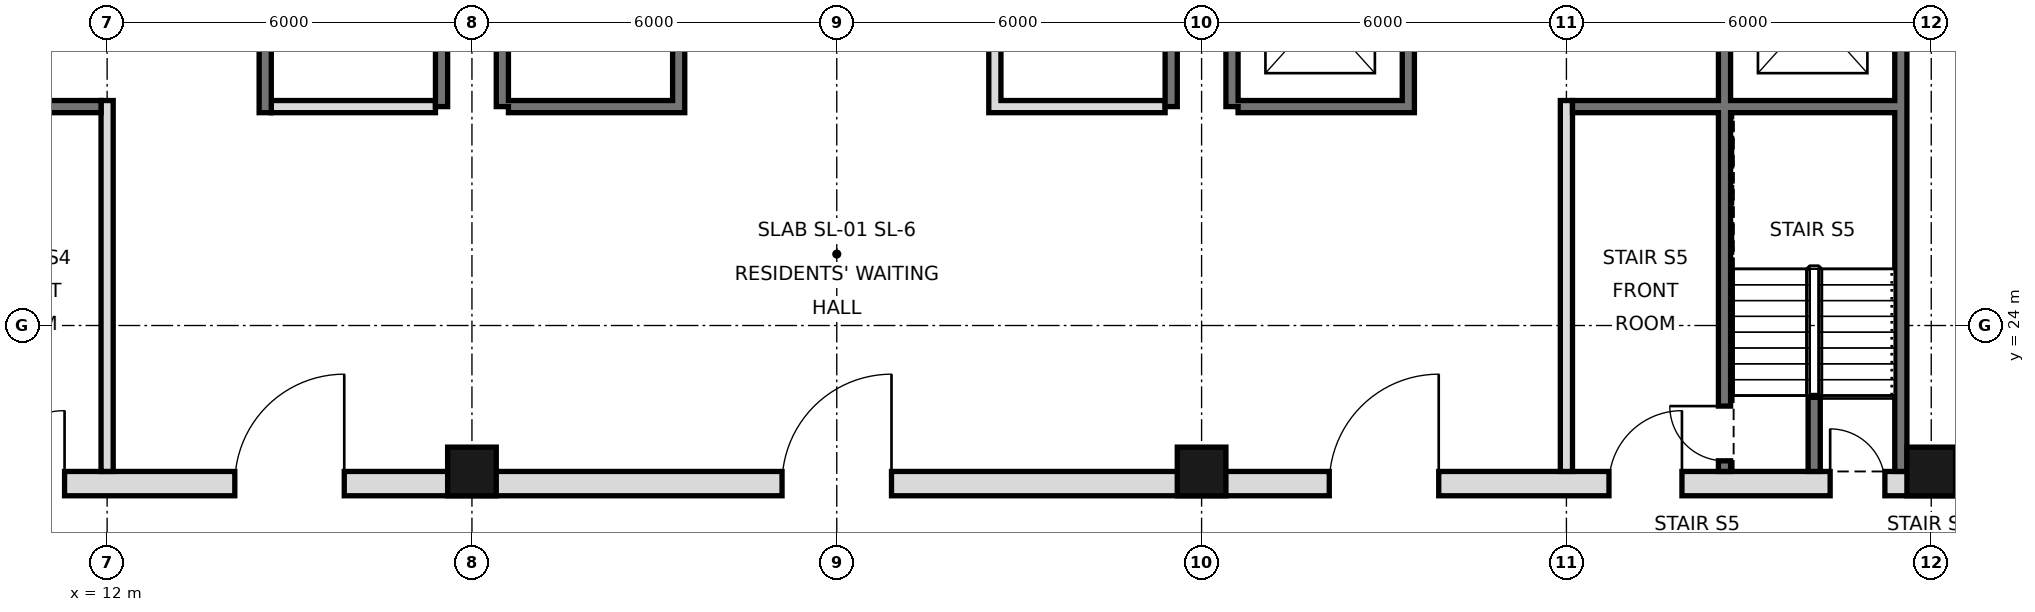
"""IFC4 building model, lengths in metres.
Left out: names, types, materials, properties, quantities, classifications, styles, units other than length and angle.
Written with IfcOpenShell. Run it as: python <this file> out.ifc"""

import sys

from ifc_helpers import new_model, si_unit, direction, frame, frame_2d, origin, origin_2d, place, context, subcontext, project, spatial, rectangle, hollow_rectangle, extrude, element, fill, save


model = new_model("IFC4")
c1 = context("Model", 3, precision=1e-05, world=origin(), true_north=direction((0.0, 1.0)))
c2 = subcontext(c1, "Body", "Model", "MODEL_VIEW")
j1 = project(units=[si_unit("LENGTHUNIT", "METRE"), si_unit("PLANEANGLEUNIT", "RADIAN")], contexts=[c1])
p1 = place(None, origin())
s1 = spatial("IfcSite", under=j1, at=p1, CompositionType="ELEMENT")
p2 = place(p1, origin())
s2 = spatial("IfcBuilding", under=s1, at=p2, CompositionType="ELEMENT")
p3 = place(p2, frame((0.0, 0.0, 186.0)))
s3 = spatial("IfcBuildingStorey", under=s2, at=p3, CompositionType="ELEMENT", Elevation=186.0)
for number, where, z_axis, x_axis in (
    (1, (18.0, 21.6, 0.0), (0.0, 0.0, 1.0), (1.0, 0.0, 0.0)),
    (2, (30.0, 21.6, 0.0), (0.0, 0.0, 1.0), (1.0, 0.0, 0.0)),
    (3, (42.0, 21.6, 0.0), (0.0, 0.0, 1.0), (1.0, 0.0, 0.0)),
):
    element("IfcColumn", number, at=place(p3, frame(where, z_axis=z_axis, x_axis=x_axis)), inside=s3, PredefinedType="COLUMN", context=c2, shape_type="SweptSolid", body=[
        extrude(hollow_rectangle(XDim=0.8, YDim=0.8, WallThickness=0.045, at=origin_2d()), origin(), (0.0, 0.0, 1.0), 6.0),
    ])
p4 = place(p3, frame((41.5, 21.6, 0.0), z_axis=(0.0, 0.0, 1.0), x_axis=(0.0, 1.0, 0.0)))
e4 = element("IfcWall", 4, at=p4, inside=s3, PredefinedType="SOLIDWALL", context=c2, shape_type="SweptSolid", body=[
    extrude(rectangle(XDim=23.5, YDim=0.2, at=frame_2d((11.75, 0.0))), origin(), (0.0, 0.0, 1.0), 5.7),
])
for number, where, z_axis, x_axis in (
    (5, (17.5, 27.6, 0.0), (0.0, 0.0, 1.0), (0.0, 1.0, 0.0)),
    (6, (18.5, 27.6, 0.0), (0.0, 0.0, 1.0), (0.0, 1.0, 0.0)),
    (7, (29.5, 27.6, 0.0), (0.0, 0.0, 1.0), (0.0, 1.0, 0.0)),
    (8, (30.5, 27.6, 0.0), (0.0, 0.0, 1.0), (0.0, 1.0, 0.0)),
):
    element("IfcWall", number, at=place(p3, frame(where, z_axis=z_axis, x_axis=x_axis)), inside=s3, PredefinedType="SOLIDWALL", context=c2, shape_type="SweptSolid", body=[
        extrude(rectangle(XDim=17.5, YDim=0.2, at=frame_2d((8.75, 0.0))), origin(), (0.0, 0.0, 1.0), 5.7),
    ])
p5 = place(p3, frame((5.6, 21.4, 0.0), z_axis=(0.0, 0.0, 1.0), x_axis=(1.0, 0.0, 0.0)))
e9 = element("IfcWall", 9, at=p5, inside=s3, PredefinedType="SOLIDWALL", context=c2, shape_type="SweptSolid", body=[
    extrude(rectangle(XDim=36.8, YDim=0.4, at=frame_2d((18.4, 0.0))), origin(), (0.0, 0.0, 1.0), 5.7),
])
p6 = place(p5, frame((8.5, 0.0, 0.0)))
e10 = element("IfcOpeningElement", 10, at=p6, cuts=e9, PredefinedType="OPENING", context=c2, shape_type="SweptSolid", body=[
    extrude(rectangle(XDim=1.8, YDim=2.1, at=frame_2d((0.9, 1.05))), frame((0.0, 0.21, 0.0), z_axis=(0.0, -1.0, 0.0), x_axis=(1.0, 0.0, 0.0)), (0.0, 0.0, 1.0), 0.42),
])
p7 = place(p5, frame((17.5, 0.0, 0.0)))
e11 = element("IfcOpeningElement", 11, at=p7, cuts=e9, PredefinedType="OPENING", context=c2, shape_type="SweptSolid", body=[
    extrude(rectangle(XDim=1.8, YDim=2.1, at=frame_2d((0.9, 1.05))), frame((0.0, 0.21, 0.0), z_axis=(0.0, -1.0, 0.0), x_axis=(1.0, 0.0, 0.0)), (0.0, 0.0, 1.0), 0.42),
])
p8 = place(p5, frame((26.5, 0.0, 0.0)))
e12 = element("IfcOpeningElement", 12, at=p8, cuts=e9, PredefinedType="OPENING", context=c2, shape_type="SweptSolid", body=[
    extrude(rectangle(XDim=1.8, YDim=2.1, at=frame_2d((0.9, 1.05))), frame((0.0, 0.21, 0.0), z_axis=(0.0, -1.0, 0.0), x_axis=(1.0, 0.0, 0.0)), (0.0, 0.0, 1.0), 0.42),
])
p9 = place(p5, frame((4.5, 0.0, 0.0)))
e13 = element("IfcOpeningElement", 13, at=p9, cuts=e9, PredefinedType="OPENING", context=c2, shape_type="SweptSolid", body=[
    extrude(rectangle(XDim=1.2, YDim=2.1, at=frame_2d((0.6, 1.05))), frame((0.0, 0.21, 0.0), z_axis=(0.0, -1.0, 0.0), x_axis=(1.0, 0.0, 0.0)), (0.0, 0.0, 1.0), 0.42),
])
p10 = place(p5, frame((31.1, 0.0, 0.0)))
e14 = element("IfcOpeningElement", 14, at=p10, cuts=e9, PredefinedType="OPENING", context=c2, shape_type="SweptSolid", body=[
    extrude(rectangle(XDim=1.2, YDim=2.1, at=frame_2d((0.6, 1.05))), frame((0.0, 0.21, 0.0), z_axis=(0.0, -1.0, 0.0), x_axis=(1.0, 0.0, 0.0)), (0.0, 0.0, 1.0), 0.42),
])
p11 = place(p5, frame((1.163, 0.0, 0.0)))
e15 = element("IfcOpeningElement", 15, at=p11, cuts=e9, PredefinedType="OPENING", context=c2, shape_type="SweptSolid", body=[
    extrude(rectangle(XDim=0.9, YDim=2.1, at=frame_2d((0.45, 1.05))), frame((0.0, 0.21, 0.0), z_axis=(0.0, -1.0, 0.0), x_axis=(1.0, 0.0, 0.0)), (0.0, 0.0, 1.0), 0.42),
])
p12 = place(p5, frame((34.738, 0.0, 0.0)))
e16 = element("IfcOpeningElement", 16, at=p12, cuts=e9, PredefinedType="OPENING", context=c2, shape_type="SweptSolid", body=[
    extrude(rectangle(XDim=0.9, YDim=2.1, at=frame_2d((0.45, 1.05))), frame((0.0, 0.21, 0.0), z_axis=(0.0, -1.0, 0.0), x_axis=(1.0, 0.0, 0.0)), (0.0, 0.0, 1.0), 0.42),
])
p13 = place(p3, frame((12.0, 21.6, 0.0), z_axis=(0.0, 0.0, 1.0), x_axis=(0.0, 1.0, 0.0)))
e17 = element("IfcWall", 17, at=p13, inside=s3, PredefinedType="PARTITIONING", context=c2, shape_type="SweptSolid", body=[
    extrude(rectangle(XDim=6.1, YDim=0.2, at=frame_2d((3.05, 0.0))), origin(), (0.0, 0.0, 1.0), 5.7),
])
p14 = place(p3, frame((14.6, 27.5, 0.0), z_axis=(0.0, 0.0, 1.0), x_axis=(0.0, 1.0, 0.0)))
e18 = element("IfcWall", 18, at=p14, inside=s3, PredefinedType="SOLIDWALL", context=c2, shape_type="SweptSolid", body=[
    extrude(rectangle(XDim=17.5, YDim=0.2, at=frame_2d((8.75, 0.0))), origin(), (0.0, 0.0, 1.0), 5.7),
])
p15 = place(p14, frame((15.4, 0.0, 0.0)))
e19 = element("IfcOpeningElement", 19, at=p15, cuts=e18, PredefinedType="OPENING", context=c2, shape_type="SweptSolid", body=[
    extrude(rectangle(XDim=1.1, YDim=2.1, at=frame_2d((0.55, 1.05))), frame((0.0, 0.11, 0.0), z_axis=(0.0, -1.0, 0.0), x_axis=(1.0, 0.0, 0.0)), (0.0, 0.0, 1.0), 0.22),
])
p16 = place(p14, frame((2.7, 0.0, 0.0)))
e20 = element("IfcOpeningElement", 20, at=p16, cuts=e18, PredefinedType="OPENING", context=c2, shape_type="SweptSolid", body=[
    extrude(rectangle(XDim=1.0, YDim=2.1, at=frame_2d((0.5, 1.05))), frame((0.0, 0.11, 0.0), z_axis=(0.0, -1.0, 0.0), x_axis=(1.0, 0.0, 0.0)), (0.0, 0.0, 1.0), 0.22),
])
p17 = place(p14, frame((9.9, 0.0, 0.0)))
e21 = element("IfcOpeningElement", 21, at=p17, cuts=e18, PredefinedType="OPENING", context=c2, shape_type="SweptSolid", body=[
    extrude(rectangle(XDim=0.9, YDim=2.1, at=frame_2d((0.45, 1.05))), frame((0.0, 0.11, 0.0), z_axis=(0.0, -1.0, 0.0), x_axis=(1.0, 0.0, 0.0)), (0.0, 0.0, 1.0), 0.22),
])
p18 = place(p3, frame((21.4, 27.5, 0.0), z_axis=(0.0, 0.0, 1.0), x_axis=(0.0, 1.0, 0.0)))
e22 = element("IfcWall", 22, at=p18, inside=s3, PredefinedType="SOLIDWALL", context=c2, shape_type="SweptSolid", body=[
    extrude(rectangle(XDim=17.5, YDim=0.2, at=frame_2d((8.75, 0.0))), origin(), (0.0, 0.0, 1.0), 5.7),
])
p19 = place(p18, frame((9.8, 0.0, 0.0)))
e23 = element("IfcOpeningElement", 23, at=p19, cuts=e22, PredefinedType="OPENING", context=c2, shape_type="SweptSolid", body=[
    extrude(rectangle(XDim=1.0, YDim=2.1, at=frame_2d((0.5, 1.05))), frame((0.0, 0.11, 0.0), z_axis=(0.0, -1.0, 0.0), x_axis=(1.0, 0.0, 0.0)), (0.0, 0.0, 1.0), 0.22),
])
p20 = place(p18, frame((16.2, 0.0, 0.0)))
e24 = element("IfcOpeningElement", 24, at=p20, cuts=e22, PredefinedType="OPENING", context=c2, shape_type="SweptSolid", body=[
    extrude(rectangle(XDim=1.0, YDim=2.1, at=frame_2d((0.5, 1.05))), frame((0.0, 0.11, 0.0), z_axis=(0.0, -1.0, 0.0), x_axis=(1.0, 0.0, 0.0)), (0.0, 0.0, 1.0), 0.22),
])
p21 = place(p18, frame((7.4, 0.0, 0.0)))
e25 = element("IfcOpeningElement", 25, at=p21, cuts=e22, PredefinedType="OPENING", context=c2, shape_type="SweptSolid", body=[
    extrude(rectangle(XDim=0.9, YDim=2.1, at=frame_2d((0.45, 1.05))), frame((0.0, 0.11, 0.0), z_axis=(0.0, -1.0, 0.0), x_axis=(1.0, 0.0, 0.0)), (0.0, 0.0, 1.0), 0.22),
])
p22 = place(p3, frame((26.6, 27.5, 0.0), z_axis=(0.0, 0.0, 1.0), x_axis=(0.0, 1.0, 0.0)))
e26 = element("IfcWall", 26, at=p22, inside=s3, PredefinedType="SOLIDWALL", context=c2, shape_type="SweptSolid", body=[
    extrude(rectangle(XDim=17.5, YDim=0.2, at=frame_2d((8.75, 0.0))), origin(), (0.0, 0.0, 1.0), 5.7),
])
p23 = place(p22, frame((4.3, 0.0, 0.0)))
e27 = element("IfcOpeningElement", 27, at=p23, cuts=e26, PredefinedType="OPENING", context=c2, shape_type="SweptSolid", body=[
    extrude(rectangle(XDim=0.9, YDim=2.1, at=frame_2d((0.45, 1.05))), frame((0.0, 0.11, 0.0), z_axis=(0.0, -1.0, 0.0), x_axis=(1.0, 0.0, 0.0)), (0.0, 0.0, 1.0), 0.22),
])
p24 = place(p22, frame((10.35, 0.0, 0.0)))
e28 = element("IfcOpeningElement", 28, at=p24, cuts=e26, PredefinedType="OPENING", context=c2, shape_type="SweptSolid", body=[
    extrude(rectangle(XDim=1.0, YDim=2.1, at=frame_2d((0.5, 1.05))), frame((0.0, 0.11, 0.0), z_axis=(0.0, -1.0, 0.0), x_axis=(1.0, 0.0, 0.0)), (0.0, 0.0, 1.0), 0.22),
])
p25 = place(p22, frame((14.575, 0.0, 0.0)))
e29 = element("IfcOpeningElement", 29, at=p25, cuts=e26, PredefinedType="OPENING", context=c2, shape_type="SweptSolid", body=[
    extrude(rectangle(XDim=1.0, YDim=2.1, at=frame_2d((0.5, 1.05))), frame((0.0, 0.11, 0.0), z_axis=(0.0, -1.0, 0.0), x_axis=(1.0, 0.0, 0.0)), (0.0, 0.0, 1.0), 0.22),
])
p26 = place(p3, frame((33.4, 27.5, 0.0), z_axis=(0.0, 0.0, 1.0), x_axis=(0.0, 1.0, 0.0)))
e30 = element("IfcWall", 30, at=p26, inside=s3, PredefinedType="SOLIDWALL", context=c2, shape_type="SweptSolid", body=[
    extrude(rectangle(XDim=17.5, YDim=0.2, at=frame_2d((8.75, 0.0))), origin(), (0.0, 0.0, 1.0), 5.7),
])
p27 = place(p26, frame((1.1, 0.0, 0.0)))
e31 = element("IfcOpeningElement", 31, at=p27, cuts=e30, PredefinedType="OPENING", context=c2, shape_type="SweptSolid", body=[
    extrude(rectangle(XDim=1.1, YDim=2.1, at=frame_2d((0.55, 1.05))), frame((0.0, 0.11, 0.0), z_axis=(0.0, -1.0, 0.0), x_axis=(1.0, 0.0, 0.0)), (0.0, 0.0, 1.0), 0.22),
])
p28 = place(p26, frame((4.2, 0.0, 0.0)))
e32 = element("IfcOpeningElement", 32, at=p28, cuts=e30, PredefinedType="OPENING", context=c2, shape_type="SweptSolid", body=[
    extrude(rectangle(XDim=1.1, YDim=2.1, at=frame_2d((0.55, 1.05))), frame((0.0, 0.11, 0.0), z_axis=(0.0, -1.0, 0.0), x_axis=(1.0, 0.0, 0.0)), (0.0, 0.0, 1.0), 0.22),
])
p29 = place(p26, frame((15.4, 0.0, 0.0)))
e33 = element("IfcOpeningElement", 33, at=p29, cuts=e30, PredefinedType="OPENING", context=c2, shape_type="SweptSolid", body=[
    extrude(rectangle(XDim=1.1, YDim=2.1, at=frame_2d((0.55, 1.05))), frame((0.0, 0.11, 0.0), z_axis=(0.0, -1.0, 0.0), x_axis=(1.0, 0.0, 0.0)), (0.0, 0.0, 1.0), 0.22),
])
p30 = place(p26, frame((9.9, 0.0, 0.0)))
e34 = element("IfcOpeningElement", 34, at=p30, cuts=e30, PredefinedType="OPENING", context=c2, shape_type="SweptSolid", body=[
    extrude(rectangle(XDim=0.9, YDim=2.1, at=frame_2d((0.45, 1.05))), frame((0.0, 0.11, 0.0), z_axis=(0.0, -1.0, 0.0), x_axis=(1.0, 0.0, 0.0)), (0.0, 0.0, 1.0), 0.22),
])
p31 = place(p3, frame((36.0, 21.6, 0.0), z_axis=(0.0, 0.0, 1.0), x_axis=(0.0, 1.0, 0.0)))
e35 = element("IfcWall", 35, at=p31, inside=s3, PredefinedType="PARTITIONING", context=c2, shape_type="SweptSolid", body=[
    extrude(rectangle(XDim=6.1, YDim=0.2, at=frame_2d((3.05, 0.0))), origin(), (0.0, 0.0, 1.0), 5.7),
])
p32 = place(p3, frame((38.6, 21.6, 0.0), z_axis=(0.0, 0.0, 1.0), x_axis=(0.0, 1.0, 0.0)))
e36 = element("IfcWall", 36, at=p32, inside=s3, PredefinedType="SOLIDWALL", context=c2, shape_type="SweptSolid", body=[
    extrude(rectangle(XDim=23.4, YDim=0.2, at=frame_2d((11.7, 0.0))), origin(), (0.0, 0.0, 1.0), 5.7),
])
p33 = place(p32, frame((7.0, 0.0, 0.0)))
e37 = element("IfcOpeningElement", 37, at=p33, cuts=e36, PredefinedType="OPENING", context=c2, shape_type="SweptSolid", body=[
    extrude(rectangle(XDim=1.1, YDim=2.1, at=frame_2d((0.55, 1.05))), frame((0.0, 0.11, 0.0), z_axis=(0.0, -1.0, 0.0), x_axis=(1.0, 0.0, 0.0)), (0.0, 0.0, 1.0), 0.22),
])
p34 = place(p32, frame((10.1, 0.0, 0.0)))
e38 = element("IfcOpeningElement", 38, at=p34, cuts=e36, PredefinedType="OPENING", context=c2, shape_type="SweptSolid", body=[
    extrude(rectangle(XDim=1.1, YDim=2.1, at=frame_2d((0.55, 1.05))), frame((0.0, 0.11, 0.0), z_axis=(0.0, -1.0, 0.0), x_axis=(1.0, 0.0, 0.0)), (0.0, 0.0, 1.0), 0.22),
])
p35 = place(p32, frame((13.2, 0.0, 0.0)))
e39 = element("IfcOpeningElement", 39, at=p35, cuts=e36, PredefinedType="OPENING", context=c2, shape_type="SweptSolid", body=[
    extrude(rectangle(XDim=1.1, YDim=2.1, at=frame_2d((0.55, 1.05))), frame((0.0, 0.11, 0.0), z_axis=(0.0, -1.0, 0.0), x_axis=(1.0, 0.0, 0.0)), (0.0, 0.0, 1.0), 0.22),
])
p36 = place(p32, frame((15.7, 0.0, 0.0)))
e40 = element("IfcOpeningElement", 40, at=p36, cuts=e36, PredefinedType="OPENING", context=c2, shape_type="SweptSolid", body=[
    extrude(rectangle(XDim=1.0, YDim=2.1, at=frame_2d((0.5, 1.05))), frame((0.0, 0.11, 0.0), z_axis=(0.0, -1.0, 0.0), x_axis=(1.0, 0.0, 0.0)), (0.0, 0.0, 1.0), 0.22),
])
p37 = place(p32, frame((22.1, 0.0, 0.0)))
e41 = element("IfcOpeningElement", 41, at=p37, cuts=e36, PredefinedType="OPENING", context=c2, shape_type="SweptSolid", body=[
    extrude(rectangle(XDim=1.0, YDim=2.1, at=frame_2d((0.5, 1.05))), frame((0.0, 0.11, 0.0), z_axis=(0.0, -1.0, 0.0), x_axis=(1.0, 0.0, 0.0)), (0.0, 0.0, 1.0), 0.22),
])
p38 = place(p32, frame((0.175, 0.0, 0.0)))
e42 = element("IfcOpeningElement", 42, at=p38, cuts=e36, PredefinedType="OPENING", context=c2, shape_type="SweptSolid", body=[
    extrude(rectangle(XDim=0.9, YDim=2.1, at=frame_2d((0.45, 1.05))), frame((0.0, 0.11, 0.0), z_axis=(0.0, -1.0, 0.0), x_axis=(1.0, 0.0, 0.0)), (0.0, 0.0, 1.0), 0.22),
])
p39 = place(p3, frame((40.075, 21.6, 0.0), z_axis=(0.0, 0.0, 1.0), x_axis=(0.0, 1.0, 0.0)))
e43 = element("IfcWall", 43, at=p39, inside=s3, PredefinedType="SOLIDWALL", context=c2, shape_type="SweptSolid", body=[
    extrude(rectangle(XDim=1.25, YDim=0.2, at=frame_2d((0.625, 0.0))), origin(), (0.0, 0.0, 1.0), 5.7),
])
p40 = place(p3, frame((14.7, 27.6, 0.0), z_axis=(0.0, 0.0, 1.0), x_axis=(1.0, 0.0, 0.0)))
e44 = element("IfcWall", 44, at=p40, inside=s3, PredefinedType="PARTITIONING", context=c2, shape_type="SweptSolid", body=[
    extrude(rectangle(XDim=2.7, YDim=0.2, at=frame_2d((1.35, 0.0))), origin(), (0.0, 0.0, 1.0), 5.7),
])
for number, where, z_axis, x_axis in (
    (45, (18.6, 27.6, 0.0), (0.0, 0.0, 1.0), (1.0, 0.0, 0.0)),
    (46, (26.7, 27.6, 0.0), (0.0, 0.0, 1.0), (1.0, 0.0, 0.0)),
    (47, (30.6, 27.6, 0.0), (0.0, 0.0, 1.0), (1.0, 0.0, 0.0)),
):
    element("IfcWall", number, at=place(p3, frame(where, z_axis=z_axis, x_axis=x_axis)), inside=s3, PredefinedType="SOLIDWALL", context=c2, shape_type="SweptSolid", body=[
        extrude(rectangle(XDim=2.7, YDim=0.2, at=frame_2d((1.35, 0.0))), origin(), (0.0, 0.0, 1.0), 5.7),
    ])
for number, where, z_axis, x_axis in (
    (48, (36.1, 27.6, 0.0), (0.0, 0.0, 1.0), (1.0, 0.0, 0.0)),
    (49, (6.6, 27.6, 0.0), (0.0, 0.0, 1.0), (1.0, 0.0, 0.0)),
):
    element("IfcWall", number, at=place(p3, frame(where, z_axis=z_axis, x_axis=x_axis)), inside=s3, PredefinedType="SOLIDWALL", context=c2, shape_type="SweptSolid", body=[
        extrude(rectangle(XDim=5.3, YDim=0.2, at=frame_2d((2.65, 0.0))), origin(), (0.0, 0.0, 1.0), 5.7),
    ])
p41 = place(p6, frame((1.8, 0.0, 0.0), z_axis=(0.0, 0.0, 1.0), x_axis=(-1.0, 0.0, 0.0)))
e50 = element("IfcDoor", 50, at=p41, inside=s3, OperationType="SINGLE_SWING_LEFT", PredefinedType="DOOR", context=c2, shape_type="SweptSolid", body=[
    extrude(rectangle(XDim=1.8, YDim=2.1, at=frame_2d((0.9, 1.05))), frame((0.0, 0.025, 0.0), z_axis=(0.0, -1.0, 0.0), x_axis=(1.0, 0.0, 0.0)), (0.0, 0.0, 1.0), 0.05),
])
fill(e10, e50)
p42 = place(p7, frame((1.8, 0.0, 0.0), z_axis=(0.0, 0.0, 1.0), x_axis=(-1.0, 0.0, 0.0)))
e51 = element("IfcDoor", 51, at=p42, inside=s3, OperationType="SINGLE_SWING_LEFT", PredefinedType="DOOR", context=c2, shape_type="SweptSolid", body=[
    extrude(rectangle(XDim=1.8, YDim=2.1, at=frame_2d((0.9, 1.05))), frame((0.0, 0.025, 0.0), z_axis=(0.0, -1.0, 0.0), x_axis=(1.0, 0.0, 0.0)), (0.0, 0.0, 1.0), 0.05),
])
fill(e11, e51)
p43 = place(p8, frame((1.8, 0.0, 0.0), z_axis=(0.0, 0.0, 1.0), x_axis=(-1.0, 0.0, 0.0)))
e52 = element("IfcDoor", 52, at=p43, inside=s3, OperationType="SINGLE_SWING_LEFT", PredefinedType="DOOR", context=c2, shape_type="SweptSolid", body=[
    extrude(rectangle(XDim=1.8, YDim=2.1, at=frame_2d((0.9, 1.05))), frame((0.0, 0.025, 0.0), z_axis=(0.0, -1.0, 0.0), x_axis=(1.0, 0.0, 0.0)), (0.0, 0.0, 1.0), 0.05),
])
fill(e12, e52)
p44 = place(p9, frame((1.2, 0.0, 0.0), z_axis=(0.0, 0.0, 1.0), x_axis=(-1.0, 0.0, 0.0)))
e53 = element("IfcDoor", 53, at=p44, inside=s3, OperationType="SINGLE_SWING_LEFT", PredefinedType="DOOR", context=c2, shape_type="SweptSolid", body=[
    extrude(rectangle(XDim=1.2, YDim=2.1, at=frame_2d((0.6, 1.05))), frame((0.0, 0.025, 0.0), z_axis=(0.0, -1.0, 0.0), x_axis=(1.0, 0.0, 0.0)), (0.0, 0.0, 1.0), 0.05),
])
fill(e13, e53)
p45 = place(p10, frame((1.2, 0.0, 0.0), z_axis=(0.0, 0.0, 1.0), x_axis=(-1.0, 0.0, 0.0)))
e54 = element("IfcDoor", 54, at=p45, inside=s3, OperationType="SINGLE_SWING_LEFT", PredefinedType="DOOR", context=c2, shape_type="SweptSolid", body=[
    extrude(rectangle(XDim=1.2, YDim=2.1, at=frame_2d((0.6, 1.05))), frame((0.0, 0.025, 0.0), z_axis=(0.0, -1.0, 0.0), x_axis=(1.0, 0.0, 0.0)), (0.0, 0.0, 1.0), 0.05),
])
fill(e14, e54)
p46 = place(p38, frame((0.9, 0.0, 0.0), z_axis=(0.0, 0.0, 1.0), x_axis=(-1.0, 0.0, 0.0)))
e55 = element("IfcDoor", 55, at=p46, inside=s3, OperationType="SINGLE_SWING_LEFT", PredefinedType="DOOR", context=c2, shape_type="SweptSolid", body=[
    extrude(rectangle(XDim=0.9, YDim=2.1, at=frame_2d((0.45, 1.05))), frame((0.0, 0.025, 0.0), z_axis=(0.0, -1.0, 0.0), x_axis=(1.0, 0.0, 0.0)), (0.0, 0.0, 1.0), 0.05),
])
fill(e42, e55)
p47 = place(p12, origin())
e56 = element("IfcDoor", 56, at=p47, inside=s3, OperationType="SINGLE_SWING_LEFT", PredefinedType="DOOR", context=c2, shape_type="SweptSolid", body=[
    extrude(rectangle(XDim=0.9, YDim=2.1, at=frame_2d((0.45, 1.05))), frame((0.0, 0.025, 0.0), z_axis=(0.0, -1.0, 0.0), x_axis=(1.0, 0.0, 0.0)), (0.0, 0.0, 1.0), 0.05),
])
fill(e16, e56)
save(model, sys.argv[1])
